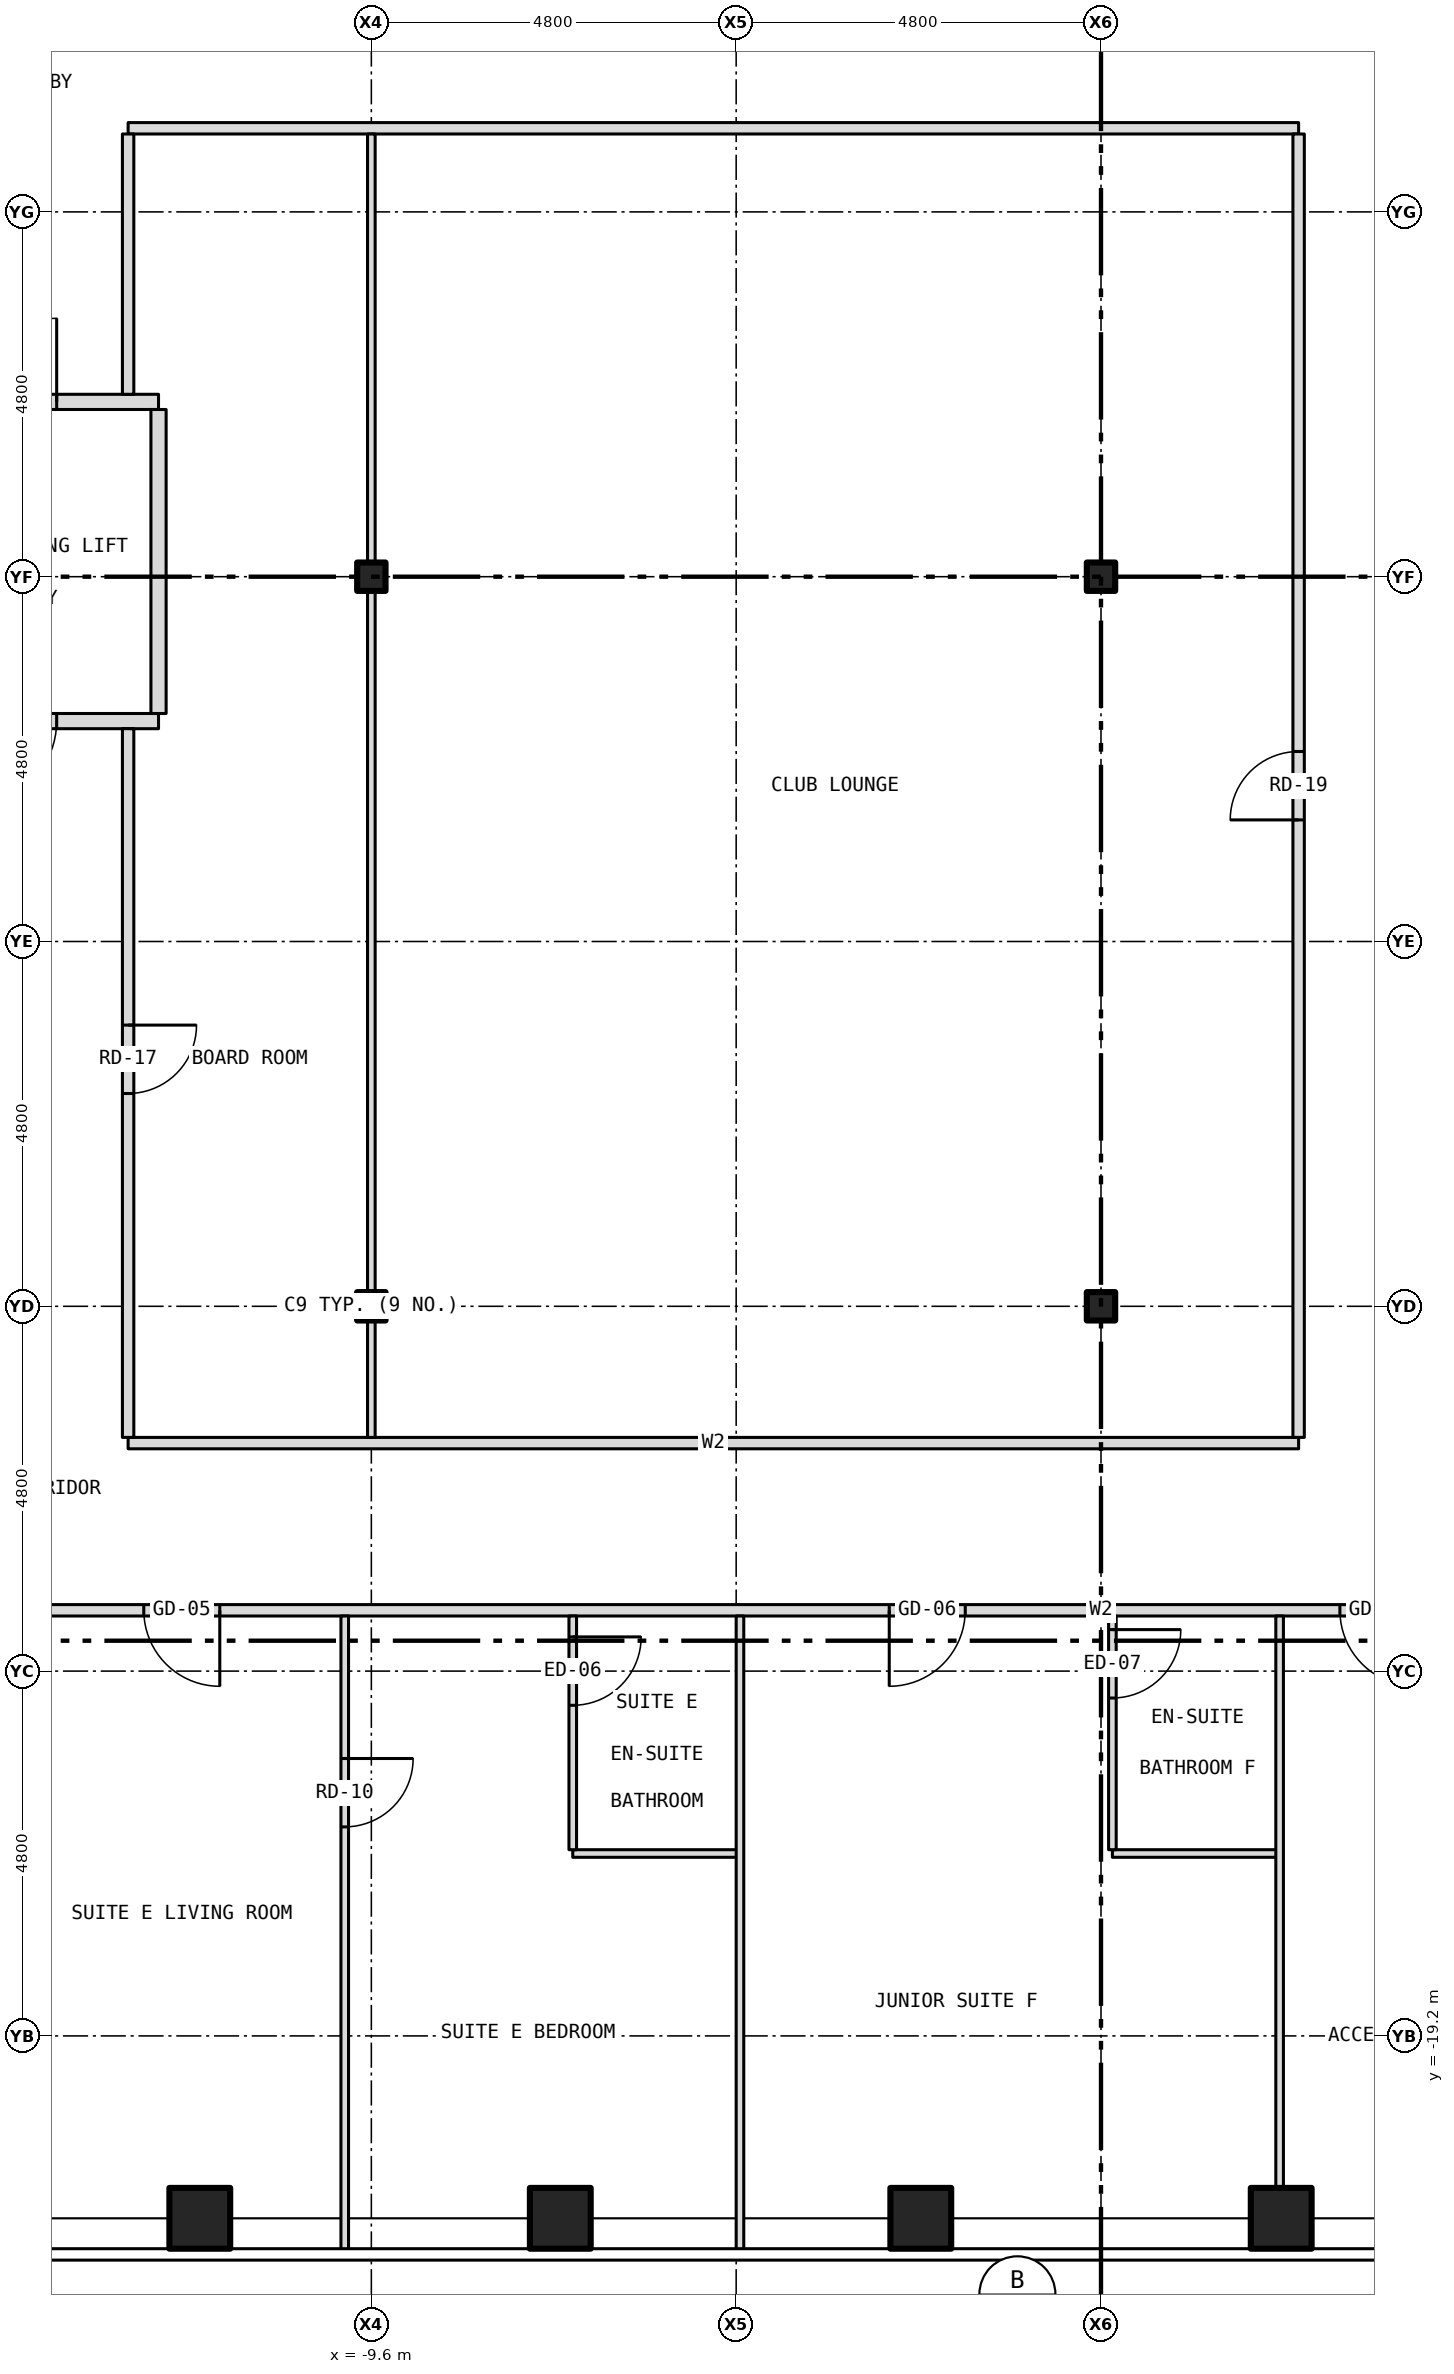
"""IFC4 building model, lengths in metres.
Left out: names, types, materials, properties, quantities, classifications, styles, units other than length and angle.
Written with IfcOpenShell. Run it as: python <this file> out.ifc"""

import sys

from ifc_helpers import new_model, si_unit, direction, frame, frame_2d, origin, origin_2d, place, context, subcontext, project, spatial, rectangle, hollow_rectangle, i_section, extrude, element, fill, save


model = new_model("IFC4")
c1 = context("Model", 3, precision=1e-05, world=origin(), true_north=direction((0.0, 1.0)))
c2 = subcontext(c1, "Body", "Model", "MODEL_VIEW")
j1 = project(units=[si_unit("LENGTHUNIT", "METRE"), si_unit("PLANEANGLEUNIT", "RADIAN")], contexts=[c1])
p1 = place(None, origin())
s1 = spatial("IfcSite", under=j1, at=p1, CompositionType="ELEMENT")
p2 = place(p1, origin())
s2 = spatial("IfcBuilding", under=s1, at=p2, CompositionType="ELEMENT")
p3 = place(p2, frame((0.0, 0.0, 155.0)))
s3 = spatial("IfcBuildingStorey", under=s2, at=p3, CompositionType="ELEMENT", Elevation=155.0)
for number, where, z_axis, x_axis in (
    (1, (-11.857, -21.6, -0.15), (0.0, 0.0, 1.0), (1.0, 0.0, 0.0)),
    (2, (-7.114, -21.6, -0.15), (0.0, 0.0, 1.0), (1.0, 0.0, 0.0)),
    (3, (-2.371, -21.6, -0.15), (0.0, 0.0, 1.0), (1.0, 0.0, 0.0)),
    (4, (2.371, -21.6, -0.15), (0.0, 0.0, 1.0), (1.0, 0.0, 0.0)),
):
    element("IfcColumn", number, at=place(p3, frame(where, z_axis=z_axis, x_axis=x_axis)), inside=s3, PredefinedType="COLUMN", context=c2, shape_type="SweptSolid", body=[
        extrude(hollow_rectangle(XDim=0.8, YDim=0.8, WallThickness=0.045, at=origin_2d()), origin(), (0.0, 0.0, 1.0), 3.5),
    ])
for number, where, z_axis, x_axis in (
    (5, (-9.6, -9.6, -0.15), (0.0, 0.0, 1.0), (1.0, 0.0, 0.0)),
    (6, (-9.6, 0.0, -0.15), (0.0, 0.0, 1.0), (1.0, 0.0, 0.0)),
    (7, (0.0, -9.6, -0.15), (0.0, 0.0, 1.0), (1.0, 0.0, 0.0)),
    (8, (0.0, 0.0, -0.15), (0.0, 0.0, 1.0), (1.0, 0.0, 0.0)),
):
    element("IfcColumn", number, at=place(p3, frame(where, z_axis=z_axis, x_axis=x_axis)), inside=s3, PredefinedType="COLUMN", context=c2, shape_type="SweptSolid", body=[
        extrude(i_section(OverallWidth=0.373, OverallDepth=0.373, WebThickness=0.016, FlangeThickness=0.026, at=origin_2d()), origin(), (0.0, 0.0, 1.0), 3.5),
    ])
p4 = place(p3, frame((-6.95, -16.8, 0.0), z_axis=(0.0, 0.0, 1.0), x_axis=(1.0, 0.0, 0.0)))
e9 = element("IfcWall", 9, at=p4, inside=s3, PredefinedType="PARTITIONING", context=c2, shape_type="SweptSolid", body=[
    extrude(rectangle(XDim=2.2, YDim=0.1, at=frame_2d((1.1, 0.0))), origin(), (0.0, 0.0, 1.0), 3.35),
])
p5 = place(p3, frame((0.15, -16.8, 0.0), z_axis=(0.0, 0.0, 1.0), x_axis=(1.0, 0.0, 0.0)))
e10 = element("IfcWall", 10, at=p5, inside=s3, PredefinedType="PARTITIONING", context=c2, shape_type="SweptSolid", body=[
    extrude(rectangle(XDim=2.2, YDim=0.1, at=frame_2d((1.1, 0.0))), origin(), (0.0, 0.0, 1.0), 3.35),
])
p6 = place(p3, frame((-15.8, -13.6, 0.0), z_axis=(0.0, 0.0, 1.0), x_axis=(1.0, 0.0, 0.0)))
e11 = element("IfcWall", 11, at=p6, inside=s3, PredefinedType="PARTITIONING", context=c2, shape_type="SweptSolid", body=[
    extrude(rectangle(XDim=31.6, YDim=0.15, at=frame_2d((15.8, 0.0))), origin(), (0.0, 0.0, 1.0), 3.35),
])
p7 = place(p6, frame((3.206, 0.0, 0.0)))
e12 = element("IfcOpeningElement", 12, at=p7, cuts=e11, PredefinedType="OPENING", context=c2, shape_type="SweptSolid", body=[
    extrude(rectangle(XDim=1.0, YDim=2.1, at=frame_2d((0.5, 1.05))), frame((0.0, 0.087, 0.0), z_axis=(0.0, -1.0, 0.0), x_axis=(1.0, 0.0, 0.0)), (0.0, 0.0, 1.0), 0.174),
])
p8 = place(p6, frame((13.014, 0.0, 0.0)))
e13 = element("IfcOpeningElement", 13, at=p8, cuts=e11, PredefinedType="OPENING", context=c2, shape_type="SweptSolid", body=[
    extrude(rectangle(XDim=1.0, YDim=2.1, at=frame_2d((0.5, 1.05))), frame((0.0, 0.087, 0.0), z_axis=(0.0, -1.0, 0.0), x_axis=(1.0, 0.0, 0.0)), (0.0, 0.0, 1.0), 0.174),
])
p9 = place(p6, frame((18.943, 0.0, 0.0)))
e14 = element("IfcOpeningElement", 14, at=p9, cuts=e11, PredefinedType="OPENING", context=c2, shape_type="SweptSolid", body=[
    extrude(rectangle(XDim=1.0, YDim=2.1, at=frame_2d((0.5, 1.05))), frame((0.0, 0.087, 0.0), z_axis=(0.0, -1.0, 0.0), x_axis=(1.0, 0.0, 0.0)), (0.0, 0.0, 1.0), 0.174),
])
p10 = place(p6, frame((24.872, 0.0, 0.0)))
e15 = element("IfcOpeningElement", 15, at=p10, cuts=e11, PredefinedType="OPENING", context=c2, shape_type="SweptSolid", body=[
    extrude(rectangle(XDim=1.0, YDim=2.1, at=frame_2d((0.5, 1.05))), frame((0.0, 0.087, 0.0), z_axis=(0.0, -1.0, 0.0), x_axis=(1.0, 0.0, 0.0)), (0.0, 0.0, 1.0), 0.174),
])
p11 = place(p3, frame((-12.8, -11.4, 0.0), z_axis=(0.0, 0.0, 1.0), x_axis=(1.0, 0.0, 0.0)))
e16 = element("IfcWall", 16, at=p11, inside=s3, PredefinedType="PARTITIONING", context=c2, shape_type="SweptSolid", body=[
    extrude(rectangle(XDim=15.4, YDim=0.15, at=frame_2d((7.7, 0.0))), origin(), (0.0, 0.0, 1.0), 3.35),
])
p12 = place(p3, frame((-15.68, -1.9, 0.0), z_axis=(0.0, 0.0, 1.0), x_axis=(1.0, 0.0, 0.0)))
e17 = element("IfcWall", 17, at=p12, inside=s3, PredefinedType="PARTITIONING", context=c2, shape_type="SweptSolid", body=[
    extrude(rectangle(XDim=3.28, YDim=0.2, at=frame_2d((1.64, 0.0))), origin(), (0.0, 0.0, 1.0), 3.35),
])
p13 = place(p12, frame((0.84, 0.0, 0.0)))
e18 = element("IfcOpeningElement", 18, at=p13, cuts=e17, PredefinedType="OPENING", context=c2, shape_type="SweptSolid", body=[
    extrude(rectangle(XDim=1.1, YDim=2.1, at=frame_2d((0.55, 1.05))), frame((0.0, 0.112, 0.0), z_axis=(0.0, -1.0, 0.0), x_axis=(1.0, 0.0, 0.0)), (0.0, 0.0, 1.0), 0.224),
])
p14 = place(p3, frame((-15.68, 2.3, 0.0), z_axis=(0.0, 0.0, 1.0), x_axis=(1.0, 0.0, 0.0)))
e19 = element("IfcWall", 19, at=p14, inside=s3, PredefinedType="PARTITIONING", context=c2, shape_type="SweptSolid", body=[
    extrude(rectangle(XDim=3.28, YDim=0.2, at=frame_2d((1.64, 0.0))), origin(), (0.0, 0.0, 1.0), 3.35),
])
p15 = place(p14, frame((0.84, 0.0, 0.0)))
e20 = element("IfcOpeningElement", 20, at=p15, cuts=e19, PredefinedType="OPENING", context=c2, shape_type="SweptSolid", body=[
    extrude(rectangle(XDim=1.1, YDim=2.1, at=frame_2d((0.55, 1.05))), frame((0.0, 0.112, 0.0), z_axis=(0.0, -1.0, 0.0), x_axis=(1.0, 0.0, 0.0)), (0.0, 0.0, 1.0), 0.224),
])
p16 = place(p3, frame((-12.8, 5.9, 0.0), z_axis=(0.0, 0.0, 1.0), x_axis=(1.0, 0.0, 0.0)))
e21 = element("IfcWall", 21, at=p16, inside=s3, PredefinedType="PARTITIONING", context=c2, shape_type="SweptSolid", body=[
    extrude(rectangle(XDim=15.4, YDim=0.15, at=frame_2d((7.7, 0.0))), origin(), (0.0, 0.0, 1.0), 3.35),
])
p17 = place(p3, frame((-12.8, -11.325, 0.0), z_axis=(0.0, 0.0, 1.0), x_axis=(0.0, 1.0, 0.0)))
e22 = element("IfcWall", 22, at=p17, inside=s3, PredefinedType="PARTITIONING", context=c2, shape_type="SweptSolid", body=[
    extrude(rectangle(XDim=9.325, YDim=0.15, at=frame_2d((4.663, 0.0))), origin(), (0.0, 0.0, 1.0), 3.35),
])
p18 = place(p17, frame((4.525, 0.0, 0.0)))
e23 = element("IfcOpeningElement", 23, at=p18, cuts=e22, PredefinedType="OPENING", context=c2, shape_type="SweptSolid", body=[
    extrude(rectangle(XDim=0.9, YDim=2.1, at=frame_2d((0.45, 1.05))), frame((0.0, 0.087, 0.0), z_axis=(0.0, -1.0, 0.0), x_axis=(1.0, 0.0, 0.0)), (0.0, 0.0, 1.0), 0.174),
])
p19 = place(p3, frame((-12.8, 2.4, 0.0), z_axis=(0.0, 0.0, 1.0), x_axis=(0.0, 1.0, 0.0)))
e24 = element("IfcWall", 24, at=p19, inside=s3, PredefinedType="PARTITIONING", context=c2, shape_type="SweptSolid", body=[
    extrude(rectangle(XDim=3.425, YDim=0.15, at=frame_2d((1.712, 0.0))), origin(), (0.0, 0.0, 1.0), 3.35),
])
p20 = place(p3, frame((-12.4, -1.8, 0.0), z_axis=(0.0, 0.0, 1.0), x_axis=(0.0, 1.0, 0.0)))
e25 = element("IfcWall", 25, at=p20, inside=s3, PredefinedType="PARTITIONING", context=c2, shape_type="SweptSolid", body=[
    extrude(rectangle(XDim=4.0, YDim=0.2, at=frame_2d((2.0, 0.0))), origin(), (0.0, 0.0, 1.0), 3.35),
])
p21 = place(p3, frame((-9.95, -22.03, 0.0), z_axis=(0.0, 0.0, 1.0), x_axis=(0.0, 1.0, 0.0)))
e26 = element("IfcWall", 26, at=p21, inside=s3, PredefinedType="PARTITIONING", context=c2, shape_type="SweptSolid", body=[
    extrude(rectangle(XDim=8.355, YDim=0.1, at=frame_2d((4.177, 0.0))), origin(), (0.0, 0.0, 1.0), 3.35),
])
p22 = place(p21, frame((5.58, 0.0, 0.0)))
e27 = element("IfcOpeningElement", 27, at=p22, cuts=e26, PredefinedType="OPENING", context=c2, shape_type="SweptSolid", body=[
    extrude(rectangle(XDim=0.9, YDim=2.1, at=frame_2d((0.45, 1.05))), frame((0.0, 0.062, 0.0), z_axis=(0.0, -1.0, 0.0), x_axis=(1.0, 0.0, 0.0)), (0.0, 0.0, 1.0), 0.124),
])
p23 = place(p3, frame((-9.6, -11.325, 0.0), z_axis=(0.0, 0.0, 1.0), x_axis=(0.0, 1.0, 0.0)))
e28 = element("IfcWall", 28, at=p23, inside=s3, PredefinedType="PARTITIONING", context=c2, shape_type="SweptSolid", body=[
    extrude(rectangle(XDim=1.538, YDim=0.1, at=frame_2d((0.769, 0.0))), origin(), (0.0, 0.0, 1.0), 2.728),
])
p24 = place(p3, frame((-9.6, -9.787, 0.0), z_axis=(0.0, 0.0, 1.0), x_axis=(0.0, 1.0, 0.0)))
e29 = element("IfcWall", 29, at=p24, inside=s3, PredefinedType="PARTITIONING", context=c2, shape_type="SweptSolid", body=[
    extrude(rectangle(XDim=0.374, YDim=0.1, at=frame_2d((0.187, 0.0))), origin(), (0.0, 0.0, 1.0), 3.35),
])
p25 = place(p3, frame((-9.6, -9.413, 0.0), z_axis=(0.0, 0.0, 1.0), x_axis=(0.0, 1.0, 0.0)))
e30 = element("IfcWall", 30, at=p25, inside=s3, PredefinedType="PARTITIONING", context=c2, shape_type="SweptSolid", body=[
    extrude(rectangle(XDim=9.226, YDim=0.1, at=frame_2d((4.613, 0.0))), origin(), (0.0, 0.0, 1.0), 2.728),
])
p26 = place(p3, frame((-9.6, -0.187, 0.0), z_axis=(0.0, 0.0, 1.0), x_axis=(0.0, 1.0, 0.0)))
e31 = element("IfcWall", 31, at=p26, inside=s3, PredefinedType="PARTITIONING", context=c2, shape_type="SweptSolid", body=[
    extrude(rectangle(XDim=0.374, YDim=0.1, at=frame_2d((0.187, 0.0))), origin(), (0.0, 0.0, 1.0), 3.35),
])
p27 = place(p3, frame((-9.6, 0.187, 0.0), z_axis=(0.0, 0.0, 1.0), x_axis=(0.0, 1.0, 0.0)))
e32 = element("IfcWall", 32, at=p27, inside=s3, PredefinedType="PARTITIONING", context=c2, shape_type="SweptSolid", body=[
    extrude(rectangle(XDim=5.638, YDim=0.1, at=frame_2d((2.819, 0.0))), origin(), (0.0, 0.0, 1.0), 2.728),
])
p28 = place(p3, frame((-6.95, -16.75, 0.0), z_axis=(0.0, 0.0, 1.0), x_axis=(0.0, 1.0, 0.0)))
e33 = element("IfcWall", 33, at=p28, inside=s3, PredefinedType="PARTITIONING", context=c2, shape_type="SweptSolid", body=[
    extrude(rectangle(XDim=3.075, YDim=0.1, at=frame_2d((1.538, 0.0))), origin(), (0.0, 0.0, 1.0), 3.35),
])
p29 = place(p28, frame((1.9, 0.0, 0.0)))
e34 = element("IfcOpeningElement", 34, at=p29, cuts=e33, PredefinedType="OPENING", context=c2, shape_type="SweptSolid", body=[
    extrude(rectangle(XDim=0.9, YDim=2.1, at=frame_2d((0.45, 1.05))), frame((0.0, 0.062, 0.0), z_axis=(0.0, -1.0, 0.0), x_axis=(1.0, 0.0, 0.0)), (0.0, 0.0, 1.0), 0.124),
])
p30 = place(p3, frame((-4.75, -22.03, 0.0), z_axis=(0.0, 0.0, 1.0), x_axis=(0.0, 1.0, 0.0)))
e35 = element("IfcWall", 35, at=p30, inside=s3, PredefinedType="PARTITIONING", context=c2, shape_type="SweptSolid", body=[
    extrude(rectangle(XDim=8.355, YDim=0.1, at=frame_2d((4.177, 0.0))), origin(), (0.0, 0.0, 1.0), 2.817),
])
p31 = place(p3, frame((0.15, -16.75, 0.0), z_axis=(0.0, 0.0, 1.0), x_axis=(0.0, 1.0, 0.0)))
e36 = element("IfcWall", 36, at=p31, inside=s3, PredefinedType="PARTITIONING", context=c2, shape_type="SweptSolid", body=[
    extrude(rectangle(XDim=3.075, YDim=0.1, at=frame_2d((1.538, 0.0))), origin(), (0.0, 0.0, 1.0), 2.728),
])
p32 = place(p31, frame((1.996, 0.0, 0.0)))
e37 = element("IfcOpeningElement", 37, at=p32, cuts=e36, PredefinedType="OPENING", context=c2, shape_type="SweptSolid", body=[
    extrude(rectangle(XDim=0.9, YDim=2.1, at=frame_2d((0.45, 1.05))), frame((0.0, 0.062, 0.0), z_axis=(0.0, -1.0, 0.0), x_axis=(1.0, 0.0, 0.0)), (0.0, 0.0, 1.0), 0.124),
])
p33 = place(p3, frame((2.35, -21.48, 0.0), z_axis=(0.0, 0.0, 1.0), x_axis=(0.0, 1.0, 0.0)))
e38 = element("IfcWall", 38, at=p33, inside=s3, PredefinedType="PARTITIONING", context=c2, shape_type="SweptSolid", body=[
    extrude(rectangle(XDim=7.805, YDim=0.1, at=frame_2d((3.902, 0.0))), origin(), (0.0, 0.0, 1.0), 3.35),
])
p34 = place(p3, frame((2.6, -11.325, 0.0), z_axis=(0.0, 0.0, 1.0), x_axis=(0.0, 1.0, 0.0)))
e39 = element("IfcWall", 39, at=p34, inside=s3, PredefinedType="PARTITIONING", context=c2, shape_type="SweptSolid", body=[
    extrude(rectangle(XDim=17.15, YDim=0.15, at=frame_2d((8.575, 0.0))), origin(), (0.0, 0.0, 1.0), 3.35),
])
p35 = place(p34, frame((8.125, 0.0, 0.0)))
e40 = element("IfcOpeningElement", 40, at=p35, cuts=e39, PredefinedType="OPENING", context=c2, shape_type="SweptSolid", body=[
    extrude(rectangle(XDim=0.9, YDim=2.1, at=frame_2d((0.45, 1.05))), frame((0.0, 0.087, 0.0), z_axis=(0.0, -1.0, 0.0), x_axis=(1.0, 0.0, 0.0)), (0.0, 0.0, 1.0), 0.174),
])
p36 = place(p15, origin())
e41 = element("IfcDoor", 41, at=p36, inside=s3, OperationType="SINGLE_SWING_RIGHT", PredefinedType="DOOR", context=c2, shape_type="SweptSolid", body=[
    extrude(rectangle(XDim=1.1, YDim=2.1, at=frame_2d((0.55, 1.05))), frame((0.0, 0.025, 0.0), z_axis=(0.0, -1.0, 0.0), x_axis=(1.0, 0.0, 0.0)), (0.0, 0.0, 1.0), 0.05),
])
fill(e20, e41)
p37 = place(p13, origin())
e42 = element("IfcDoor", 42, at=p37, inside=s3, OperationType="SINGLE_SWING_LEFT", PredefinedType="DOOR", context=c2, shape_type="SweptSolid", body=[
    extrude(rectangle(XDim=1.1, YDim=2.1, at=frame_2d((0.55, 1.05))), frame((0.0, 0.025, 0.0), z_axis=(0.0, -1.0, 0.0), x_axis=(1.0, 0.0, 0.0)), (0.0, 0.0, 1.0), 0.05),
])
fill(e18, e42)
p38 = place(p7, origin())
e43 = element("IfcDoor", 43, at=p38, inside=s3, OperationType="SINGLE_SWING_RIGHT", PredefinedType="DOOR", context=c2, shape_type="SweptSolid", body=[
    extrude(rectangle(XDim=1.0, YDim=2.1, at=frame_2d((0.5, 1.05))), frame((0.0, 0.025, 0.0), z_axis=(0.0, -1.0, 0.0), x_axis=(1.0, 0.0, 0.0)), (0.0, 0.0, 1.0), 0.05),
])
fill(e12, e43)
p39 = place(p22, origin())
e44 = element("IfcDoor", 44, at=p39, inside=s3, OperationType="SINGLE_SWING_RIGHT", PredefinedType="DOOR", context=c2, shape_type="SweptSolid", body=[
    extrude(rectangle(XDim=0.9, YDim=2.1, at=frame_2d((0.45, 1.05))), frame((0.0, 0.025, 0.0), z_axis=(0.0, -1.0, 0.0), x_axis=(1.0, 0.0, 0.0)), (0.0, 0.0, 1.0), 0.05),
])
fill(e27, e44)
p40 = place(p29, origin())
e45 = element("IfcDoor", 45, at=p40, inside=s3, OperationType="SINGLE_SWING_RIGHT", PredefinedType="DOOR", context=c2, shape_type="SweptSolid", body=[
    extrude(rectangle(XDim=0.9, YDim=2.1, at=frame_2d((0.45, 1.05))), frame((0.0, 0.025, 0.0), z_axis=(0.0, -1.0, 0.0), x_axis=(1.0, 0.0, 0.0)), (0.0, 0.0, 1.0), 0.05),
])
fill(e34, e45)
p41 = place(p8, origin())
e46 = element("IfcDoor", 46, at=p41, inside=s3, OperationType="SINGLE_SWING_LEFT", PredefinedType="DOOR", context=c2, shape_type="SweptSolid", body=[
    extrude(rectangle(XDim=1.0, YDim=2.1, at=frame_2d((0.5, 1.05))), frame((0.0, 0.025, 0.0), z_axis=(0.0, -1.0, 0.0), x_axis=(1.0, 0.0, 0.0)), (0.0, 0.0, 1.0), 0.05),
])
fill(e13, e46)
p42 = place(p32, origin())
e47 = element("IfcDoor", 47, at=p42, inside=s3, OperationType="SINGLE_SWING_RIGHT", PredefinedType="DOOR", context=c2, shape_type="SweptSolid", body=[
    extrude(rectangle(XDim=0.9, YDim=2.1, at=frame_2d((0.45, 1.05))), frame((0.0, 0.025, 0.0), z_axis=(0.0, -1.0, 0.0), x_axis=(1.0, 0.0, 0.0)), (0.0, 0.0, 1.0), 0.05),
])
fill(e37, e47)
p43 = place(p9, origin())
e48 = element("IfcDoor", 48, at=p43, inside=s3, OperationType="SINGLE_SWING_RIGHT", PredefinedType="DOOR", context=c2, shape_type="SweptSolid", body=[
    extrude(rectangle(XDim=1.0, YDim=2.1, at=frame_2d((0.5, 1.05))), frame((0.0, 0.025, 0.0), z_axis=(0.0, -1.0, 0.0), x_axis=(1.0, 0.0, 0.0)), (0.0, 0.0, 1.0), 0.05),
])
fill(e14, e48)
p44 = place(p18, origin())
e49 = element("IfcDoor", 49, at=p44, inside=s3, OperationType="SINGLE_SWING_RIGHT", PredefinedType="DOOR", context=c2, shape_type="SweptSolid", body=[
    extrude(rectangle(XDim=0.9, YDim=2.1, at=frame_2d((0.45, 1.05))), frame((0.0, 0.025, 0.0), z_axis=(0.0, -1.0, 0.0), x_axis=(1.0, 0.0, 0.0)), (0.0, 0.0, 1.0), 0.05),
])
fill(e23, e49)
p45 = place(p35, origin())
e50 = element("IfcDoor", 50, at=p45, inside=s3, OperationType="SINGLE_SWING_LEFT", PredefinedType="DOOR", context=c2, shape_type="SweptSolid", body=[
    extrude(rectangle(XDim=0.9, YDim=2.1, at=frame_2d((0.45, 1.05))), frame((0.0, 0.025, 0.0), z_axis=(0.0, -1.0, 0.0), x_axis=(1.0, 0.0, 0.0)), (0.0, 0.0, 1.0), 0.05),
])
fill(e40, e50)
save(model, sys.argv[1])
